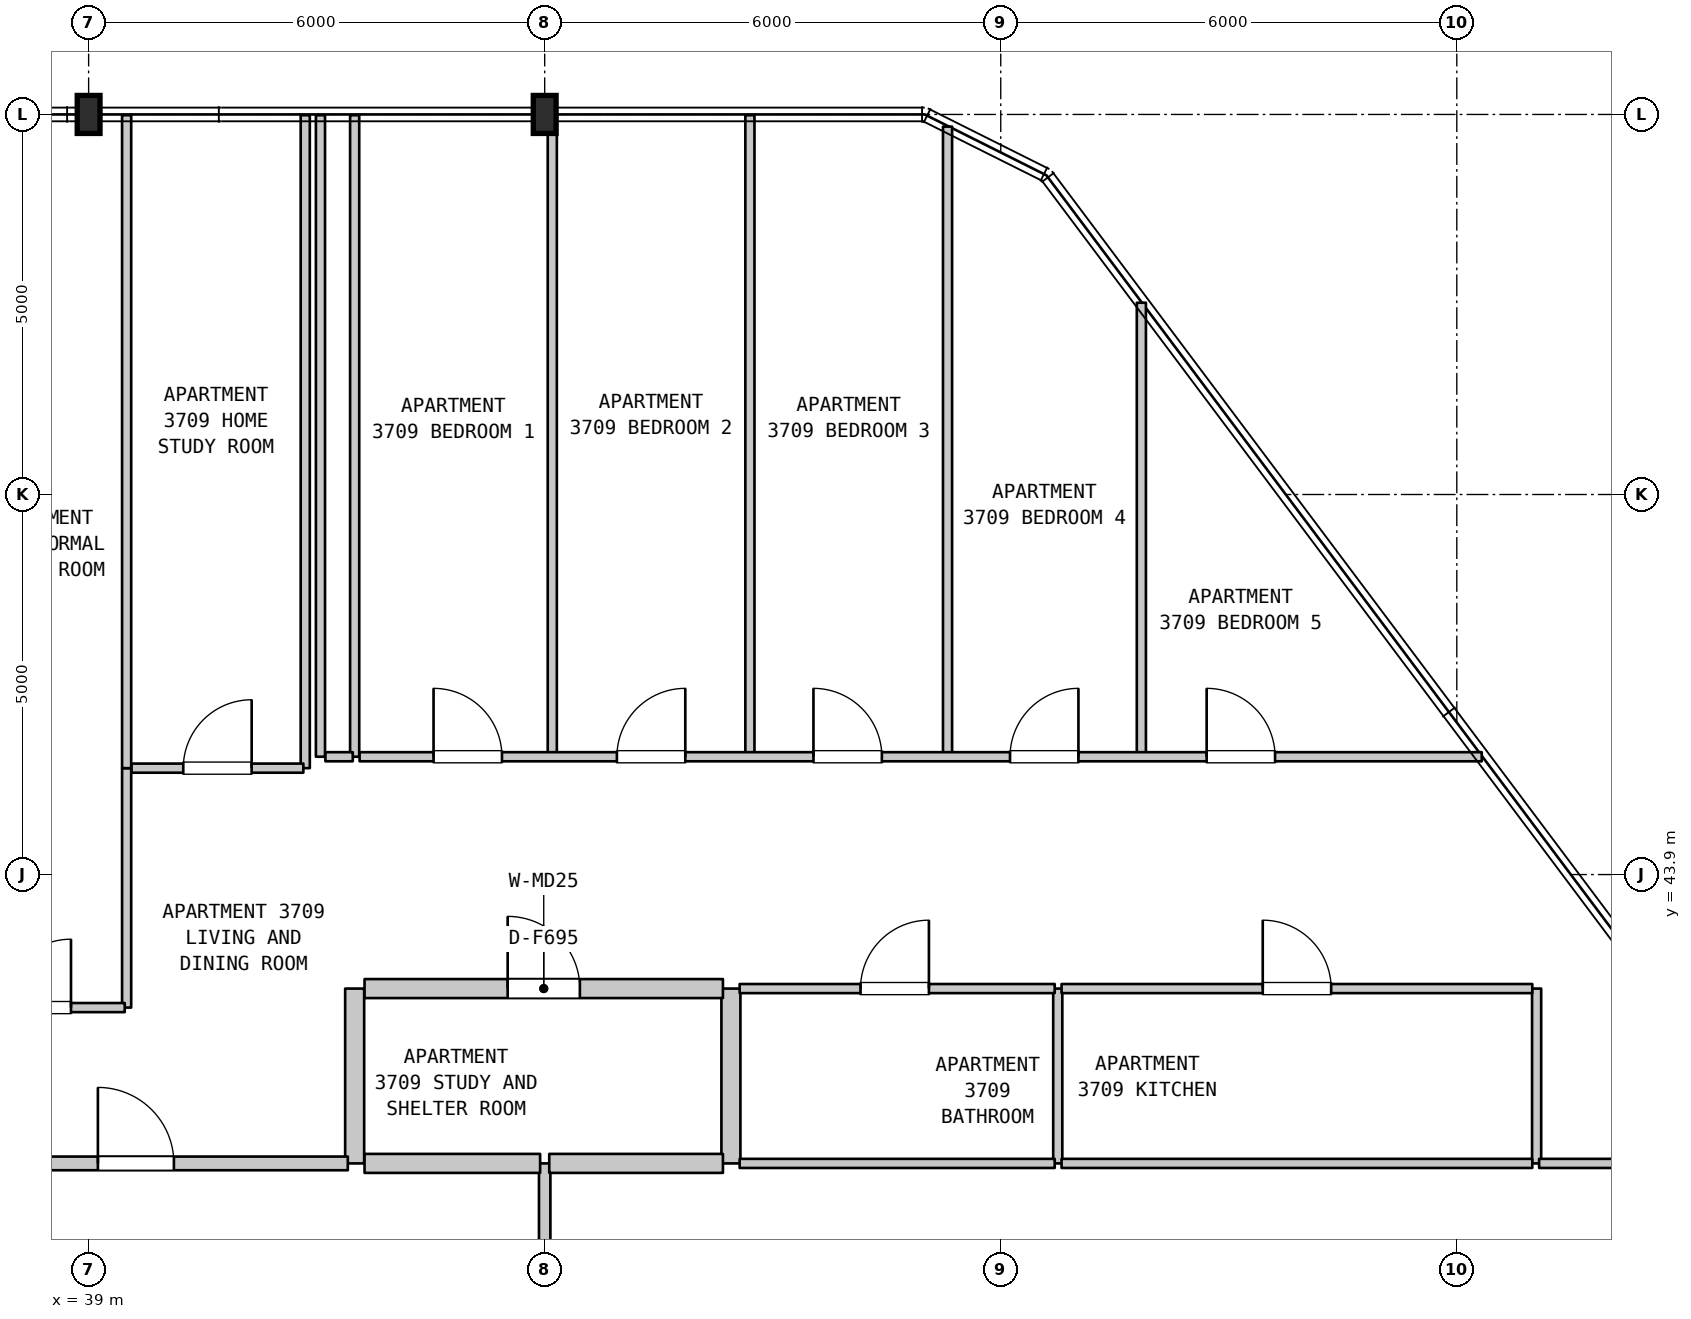
"""IFC4 building model, lengths in metres.
Left out: names, types, materials, properties, quantities, classifications, styles, units other than length and angle.
Written with IfcOpenShell. Run it as: python <this file> out.ifc"""

import sys

from ifc_helpers import new_model, si_unit, direction, frame, frame_2d, origin, origin_2d, place, context, subcontext, project, spatial, rectangle, i_section, extrude, element, fill, save


model = new_model("IFC4")
c1 = context("Model", 3, precision=1e-05, world=origin(), true_north=direction((0.0, 1.0)))
c2 = subcontext(c1, "Body", "Model", "MODEL_VIEW")
j1 = project(units=[si_unit("LENGTHUNIT", "METRE"), si_unit("PLANEANGLEUNIT", "RADIAN")], contexts=[c1])
p1 = place(None, origin())
s1 = spatial("IfcSite", under=j1, at=p1, CompositionType="ELEMENT")
p2 = place(p1, origin())
s2 = spatial("IfcBuilding", under=s1, at=p2, CompositionType="ELEMENT")
p3 = place(p2, frame((0.0, 0.0, 152.0)))
s3 = spatial("IfcBuildingStorey", under=s2, at=p3, CompositionType="ELEMENT", Elevation=152.0)
for number, where, z_axis, x_axis in (
    (1, (39.0, 53.9, 0.0), (0.0, 0.0, 1.0), (1.0, 0.0, 0.0)),
    (2, (45.0, 53.9, 0.0), (0.0, 0.0, 1.0), (1.0, 0.0, 0.0)),
):
    element("IfcColumn", number, at=place(p3, frame(where, z_axis=z_axis, x_axis=x_axis)), inside=s3, PredefinedType="COLUMN", context=c2, shape_type="SweptSolid", body=[
        extrude(i_section(OverallWidth=0.3, OverallDepth=0.5, WebThickness=0.014, FlangeThickness=0.028, FilletRadius=0.027, at=origin_2d()), origin(), (0.0, 0.0, 1.0), 3.7),
    ])
p4 = place(p3, frame((39.5, 42.15, 0.0), z_axis=(0.0, 0.0, 1.0), x_axis=(0.0, 1.0, 0.0)))
e3 = element("IfcWall", 3, at=p4, inside=s3, PredefinedType="PARTITIONING", context=c2, shape_type="SweptSolid", body=[
    extrude(rectangle(XDim=3.15, YDim=0.12, at=frame_2d((1.575, 0.0))), origin(), (0.0, 0.0, 1.0), 3.385),
])
for number, where, z_axis, x_axis in (
    (4, (39.5, 45.3, 0.0), (0.0, 0.0, 1.0), (0.0, 1.0, 0.0)),
    (5, (41.85, 45.3, 0.0), (0.0, 0.0, 1.0), (0.0, 1.0, 0.0)),
):
    element("IfcWall", number, at=place(p3, frame(where, z_axis=z_axis, x_axis=x_axis)), inside=s3, PredefinedType="PARTITIONING", context=c2, shape_type="SweptSolid", body=[
        extrude(rectangle(XDim=8.59, YDim=0.12, at=frame_2d((4.295, 0.0))), origin(), (0.0, 0.0, 1.0), 3.385),
    ])
p5 = place(p3, frame((42.05, 45.45, 0.0), z_axis=(0.0, 0.0, 1.0), x_axis=(0.0, 1.0, 0.0)))
e6 = element("IfcWall", 6, at=p5, inside=s3, PredefinedType="PARTITIONING", context=c2, shape_type="SweptSolid", body=[
    extrude(rectangle(XDim=8.44, YDim=0.12, at=frame_2d((4.22, 0.0))), origin(), (0.0, 0.0, 1.0), 3.385),
])
p6 = place(p3, frame((42.5, 40.1, 0.0), z_axis=(0.0, 0.0, 1.0), x_axis=(0.0, 1.0, 0.0)))
e7 = element("IfcWall", 7, at=p6, inside=s3, PredefinedType="STANDARD", context=c2, shape_type="SweptSolid", body=[
    extrude(rectangle(XDim=2.3, YDim=0.25, at=frame_2d((1.15, 0.0))), origin(), (0.0, 0.0, 1.0), 3.385),
])
p7 = place(p3, frame((42.5, 45.45, 0.0), z_axis=(0.0, 0.0, 1.0), x_axis=(0.0, 1.0, 0.0)))
e8 = element("IfcWall", 8, at=p7, inside=s3, PredefinedType="PARTITIONING", context=c2, shape_type="SweptSolid", body=[
    extrude(rectangle(XDim=8.44, YDim=0.12, at=frame_2d((4.22, 0.0))), origin(), (0.0, 0.0, 1.0), 3.385),
])
p8 = place(p3, frame((45.0, 37.9, 0.0), z_axis=(0.0, 0.0, 1.0), x_axis=(0.0, 1.0, 0.0)))
e9 = element("IfcWall", 9, at=p8, inside=s3, PredefinedType="STANDARD", context=c2, shape_type="SweptSolid", body=[
    extrude(rectangle(XDim=2.2, YDim=0.15, at=frame_2d((1.1, 0.0))), origin(), (0.0, 0.0, 1.0), 3.385),
])
p9 = place(p3, frame((45.1, 45.45, 0.0), z_axis=(0.0, 0.0, 1.0), x_axis=(0.0, 1.0, 0.0)))
e10 = element("IfcWall", 10, at=p9, inside=s3, PredefinedType="PARTITIONING", context=c2, shape_type="SweptSolid", body=[
    extrude(rectangle(XDim=8.44, YDim=0.12, at=frame_2d((4.22, 0.0))), origin(), (0.0, 0.0, 1.0), 3.385),
])
p10 = place(p3, frame((47.45, 40.1, 0.0), z_axis=(0.0, 0.0, 1.0), x_axis=(0.0, 1.0, 0.0)))
e11 = element("IfcWall", 11, at=p10, inside=s3, PredefinedType="STANDARD", context=c2, shape_type="SweptSolid", body=[
    extrude(rectangle(XDim=2.3, YDim=0.25, at=frame_2d((1.15, 0.0))), origin(), (0.0, 0.0, 1.0), 3.385),
])
p11 = place(p3, frame((47.7, 45.45, 0.0), z_axis=(0.0, 0.0, 1.0), x_axis=(0.0, 1.0, 0.0)))
e12 = element("IfcWall", 12, at=p11, inside=s3, PredefinedType="PARTITIONING", context=c2, shape_type="SweptSolid", body=[
    extrude(rectangle(XDim=8.44, YDim=0.12, at=frame_2d((4.22, 0.0))), origin(), (0.0, 0.0, 1.0), 3.385),
])
p12 = place(p3, frame((50.3, 45.45, 0.0), z_axis=(0.0, 0.0, 1.0), x_axis=(0.0, 1.0, 0.0)))
e13 = element("IfcWall", 13, at=p12, inside=s3, PredefinedType="PARTITIONING", context=c2, shape_type="SweptSolid", body=[
    extrude(rectangle(XDim=8.29, YDim=0.12, at=frame_2d((4.145, 0.0))), origin(), (0.0, 0.0, 1.0), 3.385),
])
p13 = place(p3, frame((51.75, 40.1, 0.0), z_axis=(0.0, 0.0, 1.0), x_axis=(0.0, 1.0, 0.0)))
e14 = element("IfcWall", 14, at=p13, inside=s3, PredefinedType="PARTITIONING", context=c2, shape_type="SweptSolid", body=[
    extrude(rectangle(XDim=2.3, YDim=0.12, at=frame_2d((1.15, 0.0))), origin(), (0.0, 0.0, 1.0), 3.385),
])
p14 = place(p3, frame((52.85, 45.45, 0.0), z_axis=(0.0, 0.0, 1.0), x_axis=(0.0, 1.0, 0.0)))
e15 = element("IfcWall", 15, at=p14, inside=s3, PredefinedType="PARTITIONING", context=c2, shape_type="SweptSolid", body=[
    extrude(rectangle(XDim=5.973, YDim=0.12, at=frame_2d((2.987, 0.0))), origin(), (0.0, 0.0, 1.0), 3.385),
])
p15 = place(p3, frame((58.05, 40.1, 0.0), z_axis=(0.0, 0.0, 1.0), x_axis=(0.0, 1.0, 0.0)))
e16 = element("IfcWall", 16, at=p15, inside=s3, PredefinedType="PARTITIONING", context=c2, shape_type="SweptSolid", body=[
    extrude(rectangle(XDim=2.3, YDim=0.12, at=frame_2d((1.15, 0.0))), origin(), (0.0, 0.0, 1.0), 3.385),
])
p16 = place(p3, frame((37.315, 40.1, 0.0), z_axis=(0.0, 0.0, 1.0), x_axis=(1.0, 0.0, 0.0)))
e17 = element("IfcWall", 17, at=p16, inside=s3, PredefinedType="STANDARD", context=c2, shape_type="SweptSolid", body=[
    extrude(rectangle(XDim=5.095, YDim=0.18, at=frame_2d((2.547, 0.0))), origin(), (0.0, 0.0, 1.0), 3.385),
])
p17 = place(p16, frame((1.807, 0.0, 0.0)))
e18 = element("IfcOpeningElement", 18, at=p17, cuts=e17, PredefinedType="OPENING", context=c2, shape_type="SweptSolid", body=[
    extrude(rectangle(XDim=1.0, YDim=2.15, at=frame_2d((0.5, 1.075))), frame((0.0, 0.1, 0.0), z_axis=(0.0, -1.0, 0.0), x_axis=(1.0, 0.0, 0.0)), (0.0, 0.0, 1.0), 0.2),
])
p18 = place(p3, frame((42.63, 40.1, 0.0), z_axis=(0.0, 0.0, 1.0), x_axis=(1.0, 0.0, 0.0)))
e19 = element("IfcWall", 19, at=p18, inside=s3, PredefinedType="STANDARD", context=c2, shape_type="SweptSolid", body=[
    extrude(rectangle(XDim=2.31, YDim=0.25, at=frame_2d((1.155, 0.0))), origin(), (0.0, 0.0, 1.0), 3.385),
])
p19 = place(p3, frame((45.06, 40.1, 0.0), z_axis=(0.0, 0.0, 1.0), x_axis=(1.0, 0.0, 0.0)))
e20 = element("IfcWall", 20, at=p19, inside=s3, PredefinedType="STANDARD", context=c2, shape_type="SweptSolid", body=[
    extrude(rectangle(XDim=2.285, YDim=0.25, at=frame_2d((1.143, 0.0))), origin(), (0.0, 0.0, 1.0), 3.385),
])
p20 = place(p3, frame((47.565, 40.1, 0.0), z_axis=(0.0, 0.0, 1.0), x_axis=(1.0, 0.0, 0.0)))
e21 = element("IfcWall", 21, at=p20, inside=s3, PredefinedType="PARTITIONING", context=c2, shape_type="SweptSolid", body=[
    extrude(rectangle(XDim=4.145, YDim=0.12, at=frame_2d((2.073, 0.0))), origin(), (0.0, 0.0, 1.0), 3.385),
])
p21 = place(p3, frame((51.8, 40.1, 0.0), z_axis=(0.0, 0.0, 1.0), x_axis=(1.0, 0.0, 0.0)))
e22 = element("IfcWall", 22, at=p21, inside=s3, PredefinedType="PARTITIONING", context=c2, shape_type="SweptSolid", body=[
    extrude(rectangle(XDim=6.193, YDim=0.12, at=frame_2d((3.096, 0.0))), origin(), (0.0, 0.0, 1.0), 3.385),
])
p22 = place(p3, frame((58.083, 40.1, 0.0), z_axis=(0.0, 0.0, 1.0), x_axis=(1.0, 0.0, 0.0)))
e23 = element("IfcWall", 23, at=p22, inside=s3, PredefinedType="PARTITIONING", context=c2, shape_type="SweptSolid", body=[
    extrude(rectangle(XDim=3.257, YDim=0.12, at=frame_2d((1.628, 0.0))), origin(), (0.0, 0.0, 1.0), 3.385),
])
p23 = place(p3, frame((37.315, 42.15, 0.0), z_axis=(0.0, 0.0, 1.0), x_axis=(1.0, 0.0, 0.0)))
e24 = element("IfcWall", 24, at=p23, inside=s3, PredefinedType="PARTITIONING", context=c2, shape_type="SweptSolid", body=[
    extrude(rectangle(XDim=2.16, YDim=0.12, at=frame_2d((1.08, 0.0))), origin(), (0.0, 0.0, 1.0), 3.385),
])
p24 = place(p23, frame((0.553, 0.0, 0.0)))
e25 = element("IfcOpeningElement", 25, at=p24, cuts=e24, PredefinedType="OPENING", context=c2, shape_type="SweptSolid", body=[
    extrude(rectangle(XDim=0.9, YDim=2.15, at=frame_2d((0.45, 1.075))), frame((0.0, 0.07, 0.0), z_axis=(0.0, -1.0, 0.0), x_axis=(1.0, 0.0, 0.0)), (0.0, 0.0, 1.0), 0.14),
])
p25 = place(p3, frame((42.63, 42.4, 0.0), z_axis=(0.0, 0.0, 1.0), x_axis=(1.0, 0.0, 0.0)))
e26 = element("IfcWall", 26, at=p25, inside=s3, PredefinedType="STANDARD", context=c2, shape_type="SweptSolid", body=[
    extrude(rectangle(XDim=4.715, YDim=0.25, at=frame_2d((2.357, 0.0))), origin(), (0.0, 0.0, 1.0), 3.385),
])
p26 = place(p25, frame((1.883, 0.0, 0.0)))
e27 = element("IfcOpeningElement", 27, at=p26, cuts=e26, PredefinedType="OPENING", context=c2, shape_type="SweptSolid", body=[
    extrude(rectangle(XDim=0.95, YDim=2.15, at=frame_2d((0.475, 1.075))), frame((0.0, 0.135, 0.0), z_axis=(0.0, -1.0, 0.0), x_axis=(1.0, 0.0, 0.0)), (0.0, 0.0, 1.0), 0.27),
])
p27 = place(p3, frame((47.565, 42.4, 0.0), z_axis=(0.0, 0.0, 1.0), x_axis=(1.0, 0.0, 0.0)))
e28 = element("IfcWall", 28, at=p27, inside=s3, PredefinedType="PARTITIONING", context=c2, shape_type="SweptSolid", body=[
    extrude(rectangle(XDim=4.145, YDim=0.12, at=frame_2d((2.073, 0.0))), origin(), (0.0, 0.0, 1.0), 3.385),
])
p28 = place(p27, frame((1.59, 0.0, 0.0)))
e29 = element("IfcOpeningElement", 29, at=p28, cuts=e28, PredefinedType="OPENING", context=c2, shape_type="SweptSolid", body=[
    extrude(rectangle(XDim=0.9, YDim=2.1, at=frame_2d((0.45, 1.05))), frame((0.0, 0.07, 0.0), z_axis=(0.0, -1.0, 0.0), x_axis=(1.0, 0.0, 0.0)), (0.0, 0.0, 1.0), 0.14),
])
p29 = place(p3, frame((51.8, 42.4, 0.0), z_axis=(0.0, 0.0, 1.0), x_axis=(1.0, 0.0, 0.0)))
e30 = element("IfcWall", 30, at=p29, inside=s3, PredefinedType="PARTITIONING", context=c2, shape_type="SweptSolid", body=[
    extrude(rectangle(XDim=6.193, YDim=0.12, at=frame_2d((3.096, 0.0))), origin(), (0.0, 0.0, 1.0), 3.385),
])
p30 = place(p29, frame((2.647, 0.0, 0.0)))
e31 = element("IfcOpeningElement", 31, at=p30, cuts=e30, PredefinedType="OPENING", context=c2, shape_type="SweptSolid", body=[
    extrude(rectangle(XDim=0.9, YDim=2.15, at=frame_2d((0.45, 1.075))), frame((0.0, 0.07, 0.0), z_axis=(0.0, -1.0, 0.0), x_axis=(1.0, 0.0, 0.0)), (0.0, 0.0, 1.0), 0.14),
])
p31 = place(p3, frame((39.565, 45.3, 0.0), z_axis=(0.0, 0.0, 1.0), x_axis=(1.0, 0.0, 0.0)))
e32 = element("IfcWall", 32, at=p31, inside=s3, PredefinedType="PARTITIONING", context=c2, shape_type="SweptSolid", body=[
    extrude(rectangle(XDim=2.26, YDim=0.12, at=frame_2d((1.13, 0.0))), origin(), (0.0, 0.0, 1.0), 3.385),
])
p32 = place(p31, frame((0.68, 0.0, 0.0)))
e33 = element("IfcOpeningElement", 33, at=p32, cuts=e32, PredefinedType="OPENING", context=c2, shape_type="SweptSolid", body=[
    extrude(rectangle(XDim=0.9, YDim=2.15, at=frame_2d((0.45, 1.075))), frame((0.0, 0.07, 0.0), z_axis=(0.0, -1.0, 0.0), x_axis=(1.0, 0.0, 0.0)), (0.0, 0.0, 1.0), 0.14),
])
p33 = place(p3, frame((42.115, 45.45, 0.0), z_axis=(0.0, 0.0, 1.0), x_axis=(1.0, 0.0, 0.0)))
e34 = element("IfcWall", 34, at=p33, inside=s3, PredefinedType="PARTITIONING", context=c2, shape_type="SweptSolid", body=[
    extrude(rectangle(XDim=0.36, YDim=0.12, at=frame_2d((0.18, 0.0))), origin(), (0.0, 0.0, 1.0), 3.385),
])
p34 = place(p3, frame((42.565, 45.45, 0.0), z_axis=(0.0, 0.0, 1.0), x_axis=(1.0, 0.0, 0.0)))
e35 = element("IfcWall", 35, at=p34, inside=s3, PredefinedType="PARTITIONING", context=c2, shape_type="SweptSolid", body=[
    extrude(rectangle(XDim=14.763, YDim=0.12, at=frame_2d((7.381, 0.0))), origin(), (0.0, 0.0, 1.0), 3.385),
])
p35 = place(p34, frame((0.973, 0.0, 0.0)))
e36 = element("IfcOpeningElement", 36, at=p35, cuts=e35, PredefinedType="OPENING", context=c2, shape_type="SweptSolid", body=[
    extrude(rectangle(XDim=0.9, YDim=2.15, at=frame_2d((0.45, 1.075))), frame((0.0, 0.07, 0.0), z_axis=(0.0, -1.0, 0.0), x_axis=(1.0, 0.0, 0.0)), (0.0, 0.0, 1.0), 0.14),
])
p36 = place(p34, frame((3.385, 0.0, 0.0)))
e37 = element("IfcOpeningElement", 37, at=p36, cuts=e35, PredefinedType="OPENING", context=c2, shape_type="SweptSolid", body=[
    extrude(rectangle(XDim=0.9, YDim=2.15, at=frame_2d((0.45, 1.075))), frame((0.0, 0.07, 0.0), z_axis=(0.0, -1.0, 0.0), x_axis=(1.0, 0.0, 0.0)), (0.0, 0.0, 1.0), 0.14),
])
p37 = place(p34, frame((5.971, 0.0, 0.0)))
e38 = element("IfcOpeningElement", 38, at=p37, cuts=e35, PredefinedType="OPENING", context=c2, shape_type="SweptSolid", body=[
    extrude(rectangle(XDim=0.9, YDim=2.15, at=frame_2d((0.45, 1.075))), frame((0.0, 0.07, 0.0), z_axis=(0.0, -1.0, 0.0), x_axis=(1.0, 0.0, 0.0)), (0.0, 0.0, 1.0), 0.14),
])
p38 = place(p34, frame((8.557, 0.0, 0.0)))
e39 = element("IfcOpeningElement", 39, at=p38, cuts=e35, PredefinedType="OPENING", context=c2, shape_type="SweptSolid", body=[
    extrude(rectangle(XDim=0.9, YDim=2.15, at=frame_2d((0.45, 1.075))), frame((0.0, 0.07, 0.0), z_axis=(0.0, -1.0, 0.0), x_axis=(1.0, 0.0, 0.0)), (0.0, 0.0, 1.0), 0.14),
])
p39 = place(p34, frame((11.144, 0.0, 0.0)))
e40 = element("IfcOpeningElement", 40, at=p39, cuts=e35, PredefinedType="OPENING", context=c2, shape_type="SweptSolid", body=[
    extrude(rectangle(XDim=0.9, YDim=2.15, at=frame_2d((0.45, 1.075))), frame((0.0, 0.07, 0.0), z_axis=(0.0, -1.0, 0.0), x_axis=(1.0, 0.0, 0.0)), (0.0, 0.0, 1.0), 0.14),
])
p40 = place(p17, origin())
e41 = element("IfcDoor", 41, at=p40, inside=s3, OperationType="SINGLE_SWING_LEFT", PredefinedType="DOOR", context=c2, shape_type="SweptSolid", body=[
    extrude(rectangle(XDim=1.0, YDim=2.15, at=frame_2d((0.5, 1.075))), frame((0.0, 0.025, 0.0), z_axis=(0.0, -1.0, 0.0), x_axis=(1.0, 0.0, 0.0)), (0.0, 0.0, 1.0), 0.05),
])
fill(e18, e41)
p41 = place(p24, origin())
e42 = element("IfcDoor", 42, at=p41, inside=s3, OperationType="SINGLE_SWING_RIGHT", PredefinedType="DOOR", context=c2, shape_type="SweptSolid", body=[
    extrude(rectangle(XDim=0.9, YDim=2.15, at=frame_2d((0.45, 1.075))), frame((0.0, 0.025, 0.0), z_axis=(0.0, -1.0, 0.0), x_axis=(1.0, 0.0, 0.0)), (0.0, 0.0, 1.0), 0.05),
])
fill(e25, e42)
p42 = place(p26, origin())
e43 = element("IfcDoor", 43, at=p42, inside=s3, OperationType="SINGLE_SWING_LEFT", PredefinedType="DOOR", context=c2, shape_type="SweptSolid", body=[
    extrude(rectangle(XDim=0.95, YDim=2.15, at=frame_2d((0.475, 1.075))), frame((0.0, 0.025, 0.0), z_axis=(0.0, -1.0, 0.0), x_axis=(1.0, 0.0, 0.0)), (0.0, 0.0, 1.0), 0.05),
])
fill(e27, e43)
p43 = place(p28, origin())
e44 = element("IfcDoor", 44, at=p43, inside=s3, OperationType="SINGLE_SWING_RIGHT", PredefinedType="DOOR", context=c2, shape_type="SweptSolid", body=[
    extrude(rectangle(XDim=0.9, YDim=2.1, at=frame_2d((0.45, 1.05))), frame((0.0, 0.025, 0.0), z_axis=(0.0, -1.0, 0.0), x_axis=(1.0, 0.0, 0.0)), (0.0, 0.0, 1.0), 0.05),
])
fill(e29, e44)
p44 = place(p30, origin())
e45 = element("IfcDoor", 45, at=p44, inside=s3, OperationType="SINGLE_SWING_LEFT", PredefinedType="DOOR", context=c2, shape_type="SweptSolid", body=[
    extrude(rectangle(XDim=0.9, YDim=2.15, at=frame_2d((0.45, 1.075))), frame((0.0, 0.025, 0.0), z_axis=(0.0, -1.0, 0.0), x_axis=(1.0, 0.0, 0.0)), (0.0, 0.0, 1.0), 0.05),
])
fill(e31, e45)
p45 = place(p32, origin())
e46 = element("IfcDoor", 46, at=p45, inside=s3, OperationType="SINGLE_SWING_RIGHT", PredefinedType="DOOR", context=c2, shape_type="SweptSolid", body=[
    extrude(rectangle(XDim=0.9, YDim=2.15, at=frame_2d((0.45, 1.075))), frame((0.0, 0.025, 0.0), z_axis=(0.0, -1.0, 0.0), x_axis=(1.0, 0.0, 0.0)), (0.0, 0.0, 1.0), 0.05),
])
fill(e33, e46)
p46 = place(p35, origin())
e47 = element("IfcDoor", 47, at=p46, inside=s3, OperationType="SINGLE_SWING_LEFT", PredefinedType="DOOR", context=c2, shape_type="SweptSolid", body=[
    extrude(rectangle(XDim=0.9, YDim=2.15, at=frame_2d((0.45, 1.075))), frame((0.0, 0.025, 0.0), z_axis=(0.0, -1.0, 0.0), x_axis=(1.0, 0.0, 0.0)), (0.0, 0.0, 1.0), 0.05),
])
fill(e36, e47)
p47 = place(p36, origin())
e48 = element("IfcDoor", 48, at=p47, inside=s3, OperationType="SINGLE_SWING_RIGHT", PredefinedType="DOOR", context=c2, shape_type="SweptSolid", body=[
    extrude(rectangle(XDim=0.9, YDim=2.15, at=frame_2d((0.45, 1.075))), frame((0.0, 0.025, 0.0), z_axis=(0.0, -1.0, 0.0), x_axis=(1.0, 0.0, 0.0)), (0.0, 0.0, 1.0), 0.05),
])
fill(e37, e48)
p48 = place(p37, origin())
e49 = element("IfcDoor", 49, at=p48, inside=s3, OperationType="SINGLE_SWING_LEFT", PredefinedType="DOOR", context=c2, shape_type="SweptSolid", body=[
    extrude(rectangle(XDim=0.9, YDim=2.15, at=frame_2d((0.45, 1.075))), frame((0.0, 0.025, 0.0), z_axis=(0.0, -1.0, 0.0), x_axis=(1.0, 0.0, 0.0)), (0.0, 0.0, 1.0), 0.05),
])
fill(e38, e49)
p49 = place(p38, origin())
e50 = element("IfcDoor", 50, at=p49, inside=s3, OperationType="SINGLE_SWING_RIGHT", PredefinedType="DOOR", context=c2, shape_type="SweptSolid", body=[
    extrude(rectangle(XDim=0.9, YDim=2.15, at=frame_2d((0.45, 1.075))), frame((0.0, 0.025, 0.0), z_axis=(0.0, -1.0, 0.0), x_axis=(1.0, 0.0, 0.0)), (0.0, 0.0, 1.0), 0.05),
])
fill(e39, e50)
p50 = place(p39, origin())
e51 = element("IfcDoor", 51, at=p50, inside=s3, OperationType="SINGLE_SWING_LEFT", PredefinedType="DOOR", context=c2, shape_type="SweptSolid", body=[
    extrude(rectangle(XDim=0.9, YDim=2.15, at=frame_2d((0.45, 1.075))), frame((0.0, 0.025, 0.0), z_axis=(0.0, -1.0, 0.0), x_axis=(1.0, 0.0, 0.0)), (0.0, 0.0, 1.0), 0.05),
])
fill(e40, e51)
save(model, sys.argv[1])
